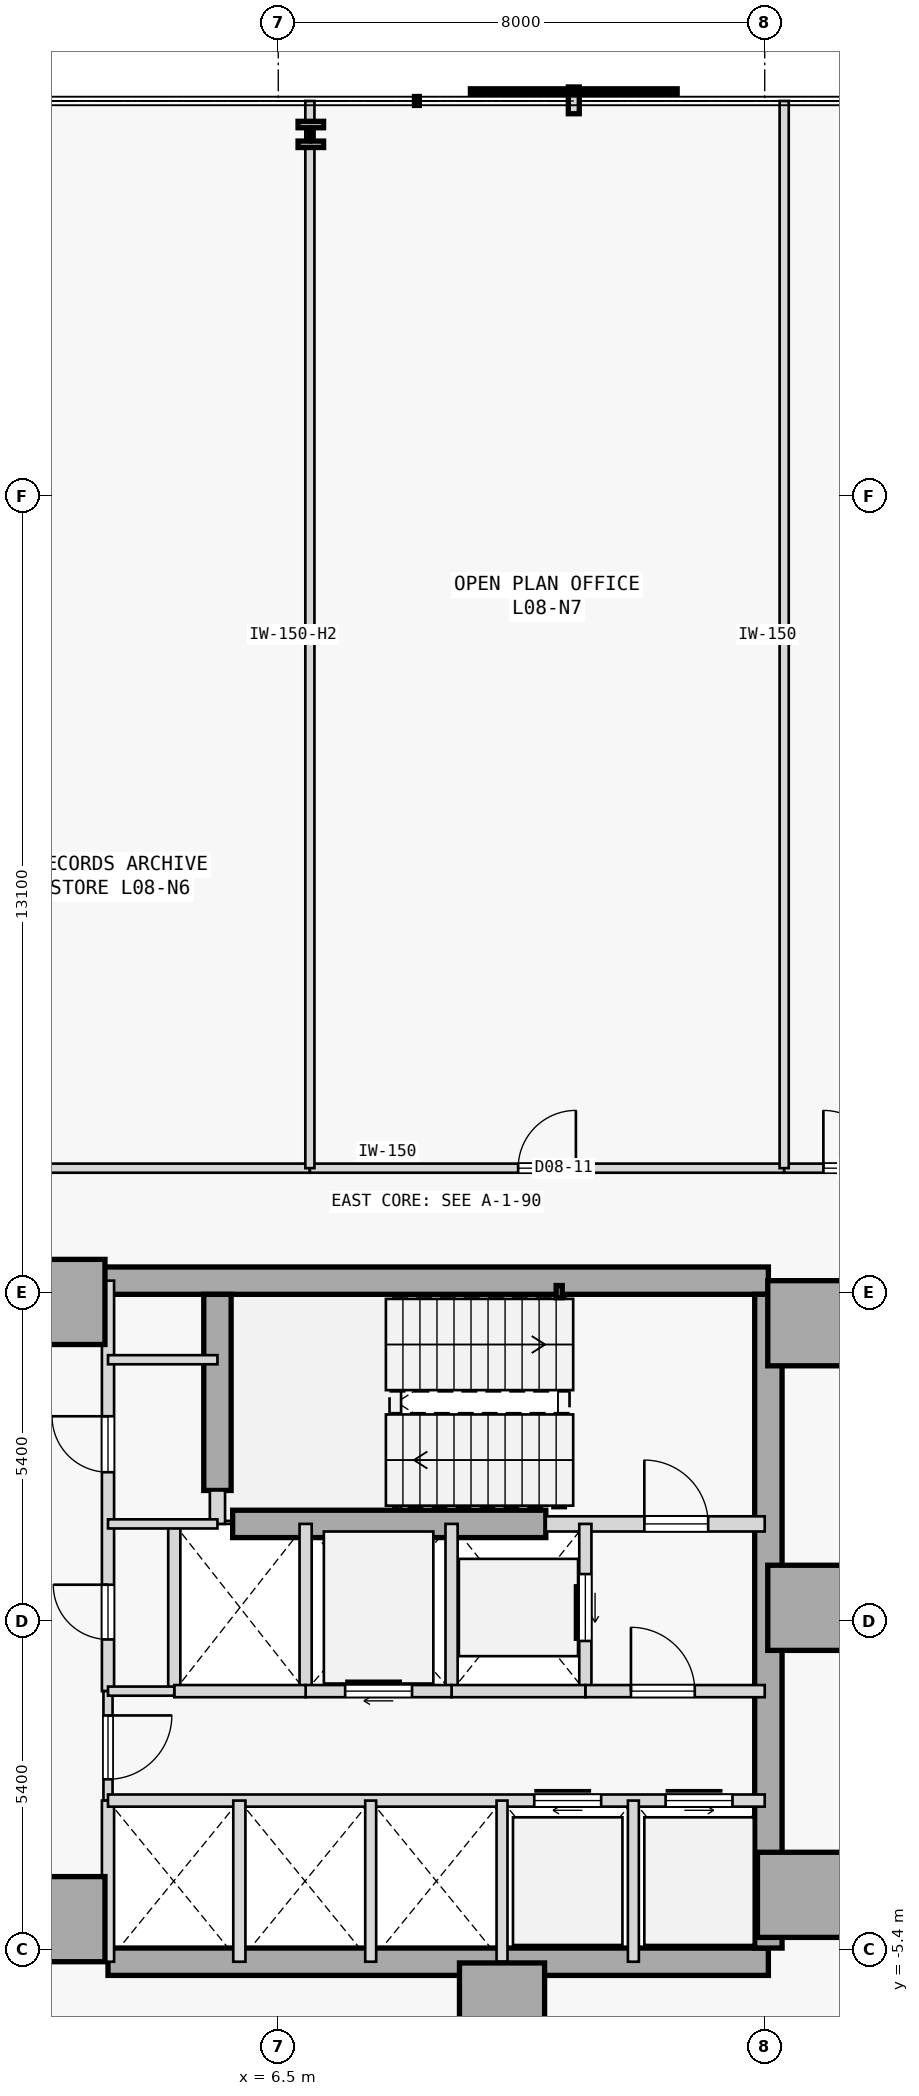
"""IFC4 building model, lengths in metres.
Left out: names, types, materials, properties, quantities, classifications, styles, units other than length and angle.
Written with IfcOpenShell. Run it as: python <this file> out.ifc"""

import sys

from ifc_helpers import new_model, si_unit, direction, frame, frame_2d, origin, origin_2d, place, context, subcontext, project, spatial, rectangle, hollow_rectangle, i_section, extrude, element, fill, save


model = new_model("IFC4")
c1 = context("Model", 3, precision=1e-05, world=origin(), true_north=direction((0.0, 1.0)))
c2 = subcontext(c1, "Body", "Model", "MODEL_VIEW")
j1 = project(units=[si_unit("LENGTHUNIT", "METRE"), si_unit("PLANEANGLEUNIT", "RADIAN")], contexts=[c1])
p1 = place(None, origin())
s1 = spatial("IfcSite", under=j1, at=p1, CompositionType="ELEMENT")
p2 = place(p1, origin())
s2 = spatial("IfcBuilding", under=s1, at=p2, CompositionType="ELEMENT")
p3 = place(p2, frame((0.0, 0.0, 37.0)))
s3 = spatial("IfcBuildingStorey", under=s2, at=p3, CompositionType="ELEMENT", Elevation=37.0)
for number, where, z_axis, x_axis in (
    (1, (15.25, 4.9, 0.0), (0.0, 0.0, 1.0), (1.0, 0.0, 0.0)),
    (2, (15.25, 0.22, 0.0), (0.0, 0.0, 1.0), (1.0, 0.0, 0.0)),
    (3, (15.08, -4.5, 0.0), (0.0, 0.0, 1.0), (1.0, 0.0, 0.0)),
    (4, (10.18, -6.32, 0.0), (0.0, 0.0, 1.0), (1.0, 0.0, 0.0)),
    (5, (2.95, -4.9, 0.0), (0.0, 0.0, 1.0), (1.0, 0.0, 0.0)),
    (6, (2.95, 5.25, 0.0), (0.0, 0.0, 1.0), (1.0, 0.0, 0.0)),
):
    element("IfcColumn", number, at=place(p3, frame(where, z_axis=z_axis, x_axis=x_axis)), inside=s3, PredefinedType="COLUMN", context=c2, shape_type="SweptSolid", body=[
        extrude(rectangle(XDim=1.4, YDim=1.4, at=origin_2d()), origin(), (0.0, 0.0, 1.0), 3.8),
    ])
p4 = place(p3, frame((3.15, 5.6, 0.0), z_axis=(0.0, 0.0, 1.0), x_axis=(1.0, 0.0, 0.0)))
e7 = element("IfcWall", 7, at=p4, inside=s3, PredefinedType="SHEAR", context=c2, shape_type="SweptSolid", body=[
    extrude(rectangle(XDim=11.41, YDim=0.45, at=frame_2d((5.705, 0.0))), origin(), (0.0, 0.0, 1.0), 3.575),
])
p5 = place(p3, frame((3.7, -5.6, 0.0), z_axis=(0.0, 0.0, 1.0), x_axis=(1.0, 0.0, 0.0)))
e8 = element("IfcWall", 8, at=p5, inside=s3, PredefinedType="SHEAR", context=c2, shape_type="SweptSolid", body=[
    extrude(rectangle(XDim=10.86, YDim=0.45, at=frame_2d((5.43, 0.0))), origin(), (0.0, 0.0, 1.0), 3.575),
])
p6 = place(p3, frame((14.56, -5.375, 0.0), z_axis=(0.0, 0.0, 1.0), x_axis=(0.0, 1.0, 0.0)))
e9 = element("IfcWall", 9, at=p6, inside=s3, PredefinedType="SHEAR", context=c2, shape_type="SweptSolid", body=[
    extrude(rectangle(XDim=10.75, YDim=0.45, at=frame_2d((5.375, 0.0))), origin(), (0.0, 0.0, 1.0), 3.575),
])
p7 = place(p3, frame((5.5, 2.15, 0.0), z_axis=(0.0, 0.0, 1.0), x_axis=(0.0, 1.0, 0.0)))
e10 = element("IfcWall", 10, at=p7, inside=s3, PredefinedType="SHEAR", context=c2, shape_type="SweptSolid", body=[
    extrude(rectangle(XDim=3.225, YDim=0.45, at=frame_2d((1.613, 0.0))), origin(), (0.0, 0.0, 1.0), 3.575),
])
p8 = place(p3, frame((5.75, 1.6, 0.0), z_axis=(0.0, 0.0, 1.0), x_axis=(1.0, 0.0, 0.0)))
e11 = element("IfcWall", 11, at=p8, inside=s3, PredefinedType="SHEAR", context=c2, shape_type="SweptSolid", body=[
    extrude(rectangle(XDim=5.15, YDim=0.45, at=frame_2d((2.575, 0.0))), origin(), (0.0, 0.0, 1.0), 3.575),
])
p9 = place(p3, frame((11.12, 5.42, 0.0), z_axis=(0.0, 0.0, 1.0), x_axis=(1.0, 0.0, 0.0)))
e12 = element("IfcColumn", 12, at=p9, inside=s3, PredefinedType="COLUMN", context=c2, shape_type="SweptSolid", body=[
    extrude(hollow_rectangle(XDim=0.1, YDim=0.2, WallThickness=0.008, at=origin_2d()), origin(), (0.0, 0.0, 1.0), 3.8),
])
p10 = place(p3, frame((7.036, 24.45, 0.0), z_axis=(0.0, 0.0, 1.0), x_axis=(1.0, 0.0, 0.0)))
e13 = element("IfcColumn", 13, at=p10, inside=s3, PredefinedType="COLUMN", context=c2, shape_type="SweptSolid", body=[
    extrude(i_section(OverallWidth=0.42, OverallDepth=0.431, WebThickness=0.065, FlangeThickness=0.106, FilletRadius=0.015, at=origin_2d()), origin(), (0.0, 0.0, 1.0), 3.8),
])
p11 = place(p3, frame((10.9, 1.6, 0.0), z_axis=(0.0, 0.0, 1.0), x_axis=(1.0, 0.0, 0.0)))
e14 = element("IfcWall", 14, at=p11, inside=s3, PredefinedType="STANDARD", context=c2, shape_type="SweptSolid", body=[
    extrude(rectangle(XDim=3.6, YDim=0.25, at=frame_2d((1.8, 0.0))), origin(), (0.0, 0.0, 1.0), 3.575),
])
p12 = place(p11, frame((1.62, 0.0, 0.0)))
e15 = element("IfcOpeningElement", 15, at=p12, cuts=e14, PredefinedType="OPENING", context=c2, shape_type="SweptSolid", body=[
    extrude(rectangle(XDim=1.05, YDim=2.15, at=frame_2d((0.525, 1.075))), frame((0.0, 0.135, 0.0), z_axis=(0.0, -1.0, 0.0), x_axis=(1.0, 0.0, 0.0)), (0.0, 0.0, 1.0), 0.27),
])
p13 = place(p3, frame((5.5, 1.6, 0.0), z_axis=(0.0, 0.0, 1.0), x_axis=(0.0, 1.0, 0.0)))
e16 = element("IfcWall", 16, at=p13, inside=s3, PredefinedType="STANDARD", context=c2, shape_type="SweptSolid", body=[
    extrude(rectangle(XDim=0.55, YDim=0.25, at=frame_2d((0.275, 0.0))), origin(), (0.0, 0.0, 1.0), 3.575),
])
p14 = place(p3, frame((3.7, -1.15, 0.0), z_axis=(0.0, 0.0, 1.0), x_axis=(0.0, 1.0, 0.0)))
e17 = element("IfcWall", 17, at=p14, inside=s3, PredefinedType="STANDARD", context=c2, shape_type="SweptSolid", body=[
    extrude(rectangle(XDim=6.75, YDim=0.2, at=frame_2d((3.375, 0.0))), origin(), (0.0, 0.0, 1.0), 3.575),
])
p15 = place(p14, frame((3.6, 0.0, 0.0)))
e18 = element("IfcOpeningElement", 18, at=p15, cuts=e17, PredefinedType="OPENING", context=c2, shape_type="SweptSolid", body=[
    extrude(rectangle(XDim=0.92, YDim=2.15, at=frame_2d((0.46, 1.075))), frame((0.0, 0.11, 0.0), z_axis=(0.0, -1.0, 0.0), x_axis=(1.0, 0.0, 0.0)), (0.0, 0.0, 1.0), 0.22),
])
p16 = place(p14, frame((0.85, 0.0, 0.0)))
e19 = element("IfcOpeningElement", 19, at=p16, cuts=e17, PredefinedType="OPENING", context=c2, shape_type="SweptSolid", body=[
    extrude(rectangle(XDim=0.9, YDim=2.15, at=frame_2d((0.45, 1.075))), frame((0.0, 0.11, 0.0), z_axis=(0.0, -1.0, 0.0), x_axis=(1.0, 0.0, 0.0)), (0.0, 0.0, 1.0), 0.22),
])
p17 = place(p3, frame((3.7, -2.95, 0.0), z_axis=(0.0, 0.0, 1.0), x_axis=(0.0, 1.0, 0.0)))
e20 = element("IfcWall", 20, at=p17, inside=s3, PredefinedType="PARTITIONING", context=c2, shape_type="SweptSolid", body=[
    extrude(rectangle(XDim=1.8, YDim=0.15, at=frame_2d((0.9, 0.0))), origin(), (0.0, 0.0, 1.0), 3.575),
])
p18 = place(p17, frame((0.35, 0.0, 0.0)))
e21 = element("IfcOpeningElement", 21, at=p18, cuts=e20, PredefinedType="OPENING", context=c2, shape_type="SweptSolid", body=[
    extrude(rectangle(XDim=1.05, YDim=2.18, at=frame_2d((0.525, 1.09))), frame((0.0, 0.085, 0.0), z_axis=(0.0, -1.0, 0.0), x_axis=(1.0, 0.0, 0.0)), (0.0, 0.0, 1.0), 0.17),
])
p19 = place(p3, frame((3.7, -5.6, 0.0), z_axis=(0.0, 0.0, 1.0), x_axis=(0.0, 1.0, 0.0)))
e22 = element("IfcWall", 22, at=p19, inside=s3, PredefinedType="STANDARD", context=c2, shape_type="SweptSolid", body=[
    extrude(rectangle(XDim=2.65, YDim=0.2, at=frame_2d((1.325, 0.0))), origin(), (0.0, 0.0, 1.0), 3.575),
])
p20 = place(p3, frame((11.55, -1.15, 0.0), z_axis=(0.0, 0.0, 1.0), x_axis=(0.0, 1.0, 0.0)))
e23 = element("IfcWall", 23, at=p20, inside=s3, PredefinedType="STANDARD", context=c2, shape_type="SweptSolid", body=[
    extrude(rectangle(XDim=2.75, YDim=0.2, at=frame_2d((1.375, 0.0))), origin(), (0.0, 0.0, 1.0), 3.575),
])
p21 = place(p20, frame((0.825, 0.0, 0.0)))
e24 = element("IfcOpeningElement", 24, at=p21, cuts=e23, PredefinedType="OPENING", context=c2, shape_type="SweptSolid", body=[
    extrude(rectangle(XDim=1.1, YDim=2.15, at=frame_2d((0.55, 1.075))), frame((0.0, 0.11, 0.0), z_axis=(0.0, -1.0, 0.0), x_axis=(1.0, 0.0, 0.0)), (0.0, 0.0, 1.0), 0.22),
])
p22 = place(p3, frame((9.35, -1.15, 0.0), z_axis=(0.0, 0.0, 1.0), x_axis=(0.0, 1.0, 0.0)))
e25 = element("IfcWall", 25, at=p22, inside=s3, PredefinedType="STANDARD", context=c2, shape_type="SweptSolid", body=[
    extrude(rectangle(XDim=2.75, YDim=0.2, at=frame_2d((1.375, 0.0))), origin(), (0.0, 0.0, 1.0), 3.575),
])
p23 = place(p3, frame((11.55, -1.15, 0.0), z_axis=(0.0, 0.0, 1.0), x_axis=(1.0, 0.0, 0.0)))
e26 = element("IfcWall", 26, at=p23, inside=s3, PredefinedType="STANDARD", context=c2, shape_type="SweptSolid", body=[
    extrude(rectangle(XDim=2.95, YDim=0.2, at=frame_2d((1.475, 0.0))), origin(), (0.0, 0.0, 1.0), 3.575),
])
p24 = place(p23, frame((0.75, 0.0, 0.0)))
e27 = element("IfcOpeningElement", 27, at=p24, cuts=e26, PredefinedType="OPENING", context=c2, shape_type="SweptSolid", body=[
    extrude(rectangle(XDim=1.05, YDim=2.18, at=frame_2d((0.525, 1.09))), frame((0.0, 0.11, 0.0), z_axis=(0.0, -1.0, 0.0), x_axis=(1.0, 0.0, 0.0)), (0.0, 0.0, 1.0), 0.22),
])
p25 = place(p3, frame((9.35, -1.15, 0.0), z_axis=(0.0, 0.0, 1.0), x_axis=(1.0, 0.0, 0.0)))
e28 = element("IfcWall", 28, at=p25, inside=s3, PredefinedType="STANDARD", context=c2, shape_type="SweptSolid", body=[
    extrude(rectangle(XDim=2.2, YDim=0.2, at=frame_2d((1.1, 0.0))), origin(), (0.0, 0.0, 1.0), 3.575),
])
p26 = place(p3, frame((6.95, -1.15, 0.0), z_axis=(0.0, 0.0, 1.0), x_axis=(0.0, 1.0, 0.0)))
e29 = element("IfcWall", 29, at=p26, inside=s3, PredefinedType="STANDARD", context=c2, shape_type="SweptSolid", body=[
    extrude(rectangle(XDim=2.75, YDim=0.2, at=frame_2d((1.375, 0.0))), origin(), (0.0, 0.0, 1.0), 3.575),
])
p27 = place(p3, frame((6.95, -1.15, 0.0), z_axis=(0.0, 0.0, 1.0), x_axis=(1.0, 0.0, 0.0)))
e30 = element("IfcWall", 30, at=p27, inside=s3, PredefinedType="STANDARD", context=c2, shape_type="SweptSolid", body=[
    extrude(rectangle(XDim=2.4, YDim=0.2, at=frame_2d((1.2, 0.0))), origin(), (0.0, 0.0, 1.0), 3.575),
])
p28 = place(p27, frame((0.65, 0.0, 0.0)))
e31 = element("IfcOpeningElement", 31, at=p28, cuts=e30, PredefinedType="OPENING", context=c2, shape_type="SweptSolid", body=[
    extrude(rectangle(XDim=1.1, YDim=2.15, at=frame_2d((0.55, 1.075))), frame((0.0, 0.11, 0.0), z_axis=(0.0, -1.0, 0.0), x_axis=(1.0, 0.0, 0.0)), (0.0, 0.0, 1.0), 0.22),
])
p29 = place(p3, frame((4.79, -1.15, 0.0), z_axis=(0.0, 0.0, 1.0), x_axis=(0.0, 1.0, 0.0)))
e32 = element("IfcWall", 32, at=p29, inside=s3, PredefinedType="STANDARD", context=c2, shape_type="SweptSolid", body=[
    extrude(rectangle(XDim=2.75, YDim=0.2, at=frame_2d((1.375, 0.0))), origin(), (0.0, 0.0, 1.0), 3.575),
])
p30 = place(p3, frame((4.79, -1.15, 0.0), z_axis=(0.0, 0.0, 1.0), x_axis=(1.0, 0.0, 0.0)))
e33 = element("IfcWall", 33, at=p30, inside=s3, PredefinedType="STANDARD", context=c2, shape_type="SweptSolid", body=[
    extrude(rectangle(XDim=2.16, YDim=0.2, at=frame_2d((1.08, 0.0))), origin(), (0.0, 0.0, 1.0), 3.575),
])
p31 = place(p3, frame((3.7, -1.15, 0.0), z_axis=(0.0, 0.0, 1.0), x_axis=(1.0, 0.0, 0.0)))
e34 = element("IfcWall", 34, at=p31, inside=s3, PredefinedType="PARTITIONING", context=c2, shape_type="SweptSolid", body=[
    extrude(rectangle(XDim=1.09, YDim=0.15, at=frame_2d((0.545, 0.0))), origin(), (0.0, 0.0, 1.0), 3.575),
])
p32 = place(p3, frame((3.7, -2.95, 0.0), z_axis=(0.0, 0.0, 1.0), x_axis=(1.0, 0.0, 0.0)))
e35 = element("IfcWall", 35, at=p32, inside=s3, PredefinedType="STANDARD", context=c2, shape_type="SweptSolid", body=[
    extrude(rectangle(XDim=10.8, YDim=0.2, at=frame_2d((5.4, 0.0))), origin(), (0.0, 0.0, 1.0), 3.575),
])
p33 = place(p32, frame((7.01, 0.0, 0.0)))
e36 = element("IfcOpeningElement", 36, at=p33, cuts=e35, PredefinedType="OPENING", context=c2, shape_type="SweptSolid", body=[
    extrude(rectangle(XDim=1.1, YDim=2.15, at=frame_2d((0.55, 1.075))), frame((0.0, 0.11, 0.0), z_axis=(0.0, -1.0, 0.0), x_axis=(1.0, 0.0, 0.0)), (0.0, 0.0, 1.0), 0.22),
])
p34 = place(p32, frame((9.17, 0.0, 0.0)))
e37 = element("IfcOpeningElement", 37, at=p34, cuts=e35, PredefinedType="OPENING", context=c2, shape_type="SweptSolid", body=[
    extrude(rectangle(XDim=1.1, YDim=2.15, at=frame_2d((0.55, 1.075))), frame((0.0, 0.11, 0.0), z_axis=(0.0, -1.0, 0.0), x_axis=(1.0, 0.0, 0.0)), (0.0, 0.0, 1.0), 0.22),
])
p35 = place(p3, frame((5.86, -5.6, 0.0), z_axis=(0.0, 0.0, 1.0), x_axis=(0.0, 1.0, 0.0)))
e38 = element("IfcWall", 38, at=p35, inside=s3, PredefinedType="STANDARD", context=c2, shape_type="SweptSolid", body=[
    extrude(rectangle(XDim=2.65, YDim=0.2, at=frame_2d((1.325, 0.0))), origin(), (0.0, 0.0, 1.0), 3.575),
])
for number, where, z_axis, x_axis in (
    (39, (12.34, -5.6, 0.0), (0.0, 0.0, 1.0), (0.0, 1.0, 0.0)),
    (40, (10.18, -5.6, 0.0), (0.0, 0.0, 1.0), (0.0, 1.0, 0.0)),
    (41, (8.02, -5.6, 0.0), (0.0, 0.0, 1.0), (0.0, 1.0, 0.0)),
):
    element("IfcWall", number, at=place(p3, frame(where, z_axis=z_axis, x_axis=x_axis)), inside=s3, PredefinedType="STANDARD", context=c2, shape_type="SweptSolid", body=[
        extrude(rectangle(XDim=2.65, YDim=0.18, at=frame_2d((1.325, 0.0))), origin(), (0.0, 0.0, 1.0), 3.575),
    ])
for number, where, z_axis, x_axis in (
    (42, (3.7, 4.3, 0.0), (0.0, 0.0, 1.0), (1.0, 0.0, 0.0)),
    (43, (3.7, 1.6, 0.0), (0.0, 0.0, 1.0), (1.0, 0.0, 0.0)),
):
    element("IfcWall", number, at=place(p3, frame(where, z_axis=z_axis, x_axis=x_axis)), inside=s3, PredefinedType="PARTITIONING", context=c2, shape_type="SweptSolid", body=[
        extrude(rectangle(XDim=1.8, YDim=0.15, at=frame_2d((0.9, 0.0))), origin(), (0.0, 0.0, 1.0), 3.575),
    ])
p36 = place(p3, frame((0.92, 7.45, 0.0), z_axis=(0.0, 0.0, 1.0), x_axis=(1.0, 0.0, 0.0)))
e44 = element("IfcWall", 44, at=p36, inside=s3, PredefinedType="PARTITIONING", context=c2, shape_type="SweptSolid", body=[
    extrude(rectangle(XDim=6.1, YDim=0.15, at=frame_2d((3.05, 0.0))), origin(), (0.0, 0.0, 1.0), 3.575),
])
p37 = place(p3, frame((7.02, 7.45, 0.0), z_axis=(0.0, 0.0, 1.0), x_axis=(1.0, 0.0, 0.0)))
e45 = element("IfcWall", 45, at=p37, inside=s3, PredefinedType="PARTITIONING", context=c2, shape_type="SweptSolid", body=[
    extrude(rectangle(XDim=7.8, YDim=0.15, at=frame_2d((3.9, 0.0))), origin(), (0.0, 0.0, 1.0), 3.575),
])
p38 = place(p37, frame((3.425, 0.0, 0.0)))
e46 = element("IfcOpeningElement", 46, at=p38, cuts=e45, PredefinedType="OPENING", context=c2, shape_type="SweptSolid", body=[
    extrude(rectangle(XDim=0.95, YDim=2.15, at=frame_2d((0.475, 1.075))), frame((0.0, 0.085, 0.0), z_axis=(0.0, -1.0, 0.0), x_axis=(1.0, 0.0, 0.0)), (0.0, 0.0, 1.0), 0.17),
])
p39 = place(p3, frame((14.82, 7.45, 0.0), z_axis=(0.0, 0.0, 1.0), x_axis=(1.0, 0.0, 0.0)))
e47 = element("IfcWall", 47, at=p39, inside=s3, PredefinedType="PARTITIONING", context=c2, shape_type="SweptSolid", body=[
    extrude(rectangle(XDim=2.239, YDim=0.15, at=frame_2d((1.12, 0.0))), origin(), (0.0, 0.0, 1.0), 3.575),
])
p40 = place(p39, frame((0.645, 0.0, 0.0)))
e48 = element("IfcOpeningElement", 48, at=p40, cuts=e47, PredefinedType="OPENING", context=c2, shape_type="SweptSolid", body=[
    extrude(rectangle(XDim=0.95, YDim=2.15, at=frame_2d((0.475, 1.075))), frame((0.0, 0.085, 0.0), z_axis=(0.0, -1.0, 0.0), x_axis=(1.0, 0.0, 0.0)), (0.0, 0.0, 1.0), 0.17),
])
p41 = place(p3, frame((7.02, 7.45, 0.0), z_axis=(0.0, 0.0, 1.0), x_axis=(0.0, 1.0, 0.0)))
e49 = element("IfcWall", 49, at=p41, inside=s3, PredefinedType="PARTITIONING", context=c2, shape_type="SweptSolid", body=[
    extrude(rectangle(XDim=17.55, YDim=0.15, at=frame_2d((8.775, 0.0))), origin(), (0.0, 0.0, 1.0), 2.975),
])
p42 = place(p3, frame((14.82, 7.45, 0.0), z_axis=(0.0, 0.0, 1.0), x_axis=(0.0, 1.0, 0.0)))
e50 = element("IfcWall", 50, at=p42, inside=s3, PredefinedType="PARTITIONING", context=c2, shape_type="SweptSolid", body=[
    extrude(rectangle(XDim=17.55, YDim=0.15, at=frame_2d((8.775, 0.0))), origin(), (0.0, 0.0, 1.0), 3.575),
])
p43 = place(p12, origin())
e51 = element("IfcDoor", 51, at=p43, inside=s3, OperationType="SINGLE_SWING_LEFT", PredefinedType="DOOR", context=c2, shape_type="SweptSolid", body=[
    extrude(rectangle(XDim=1.05, YDim=2.15, at=frame_2d((0.525, 1.075))), frame((0.0, 0.025, 0.0), z_axis=(0.0, -1.0, 0.0), x_axis=(1.0, 0.0, 0.0)), (0.0, 0.0, 1.0), 0.05),
])
fill(e15, e51)
p44 = place(p24, origin())
e52 = element("IfcDoor", 52, at=p44, inside=s3, OperationType="SINGLE_SWING_LEFT", PredefinedType="DOOR", context=c2, shape_type="SweptSolid", body=[
    extrude(rectangle(XDim=1.05, YDim=2.18, at=frame_2d((0.525, 1.09))), frame((0.0, 0.025, 0.0), z_axis=(0.0, -1.0, 0.0), x_axis=(1.0, 0.0, 0.0)), (0.0, 0.0, 1.0), 0.05),
])
fill(e27, e52)
p45 = place(p18, frame((1.05, 0.0, 0.0), z_axis=(0.0, 0.0, 1.0), x_axis=(-1.0, 0.0, 0.0)))
e53 = element("IfcDoor", 53, at=p45, inside=s3, OperationType="SINGLE_SWING_RIGHT", PredefinedType="DOOR", context=c2, shape_type="SweptSolid", body=[
    extrude(rectangle(XDim=1.05, YDim=2.18, at=frame_2d((0.525, 1.09))), frame((0.0, 0.025, 0.0), z_axis=(0.0, -1.0, 0.0), x_axis=(1.0, 0.0, 0.0)), (0.0, 0.0, 1.0), 0.05),
])
fill(e21, e53)
p46 = place(p21, origin())
e54 = element("IfcDoor", 54, at=p46, inside=s3, OperationType="SLIDING_TO_RIGHT", PredefinedType="DOOR", context=c2, shape_type="SweptSolid", body=[
    extrude(rectangle(XDim=1.1, YDim=2.15, at=frame_2d((0.55, 1.075))), frame((0.0, 0.025, 0.0), z_axis=(0.0, -1.0, 0.0), x_axis=(1.0, 0.0, 0.0)), (0.0, 0.0, 1.0), 0.05),
])
fill(e24, e54)
p47 = place(p28, origin())
e55 = element("IfcDoor", 55, at=p47, inside=s3, OperationType="SLIDING_TO_RIGHT", PredefinedType="DOOR", context=c2, shape_type="SweptSolid", body=[
    extrude(rectangle(XDim=1.1, YDim=2.15, at=frame_2d((0.55, 1.075))), frame((0.0, 0.025, 0.0), z_axis=(0.0, -1.0, 0.0), x_axis=(1.0, 0.0, 0.0)), (0.0, 0.0, 1.0), 0.05),
])
fill(e31, e55)
p48 = place(p33, origin())
e56 = element("IfcDoor", 56, at=p48, inside=s3, OperationType="SLIDING_TO_RIGHT", PredefinedType="DOOR", context=c2, shape_type="SweptSolid", body=[
    extrude(rectangle(XDim=1.1, YDim=2.15, at=frame_2d((0.55, 1.075))), frame((0.0, 0.025, 0.0), z_axis=(0.0, -1.0, 0.0), x_axis=(1.0, 0.0, 0.0)), (0.0, 0.0, 1.0), 0.05),
])
fill(e36, e56)
p49 = place(p34, origin())
e57 = element("IfcDoor", 57, at=p49, inside=s3, OperationType="SLIDING_TO_LEFT", PredefinedType="DOOR", context=c2, shape_type="SweptSolid", body=[
    extrude(rectangle(XDim=1.1, YDim=2.15, at=frame_2d((0.55, 1.075))), frame((0.0, 0.025, 0.0), z_axis=(0.0, -1.0, 0.0), x_axis=(1.0, 0.0, 0.0)), (0.0, 0.0, 1.0), 0.05),
])
fill(e37, e57)
p50 = place(p15, origin())
e58 = element("IfcDoor", 58, at=p50, inside=s3, OperationType="SINGLE_SWING_RIGHT", PredefinedType="DOOR", context=c2, shape_type="SweptSolid", body=[
    extrude(rectangle(XDim=0.92, YDim=2.15, at=frame_2d((0.46, 1.075))), frame((0.0, 0.025, 0.0), z_axis=(0.0, -1.0, 0.0), x_axis=(1.0, 0.0, 0.0)), (0.0, 0.0, 1.0), 0.05),
])
fill(e18, e58)
p51 = place(p16, origin())
e59 = element("IfcDoor", 59, at=p51, inside=s3, OperationType="SINGLE_SWING_RIGHT", PredefinedType="DOOR", context=c2, shape_type="SweptSolid", body=[
    extrude(rectangle(XDim=0.9, YDim=2.15, at=frame_2d((0.45, 1.075))), frame((0.0, 0.025, 0.0), z_axis=(0.0, -1.0, 0.0), x_axis=(1.0, 0.0, 0.0)), (0.0, 0.0, 1.0), 0.05),
])
fill(e19, e59)
p52 = place(p38, origin())
e60 = element("IfcDoor", 60, at=p52, inside=s3, OperationType="SINGLE_SWING_RIGHT", PredefinedType="DOOR", context=c2, shape_type="SweptSolid", body=[
    extrude(rectangle(XDim=0.95, YDim=2.15, at=frame_2d((0.475, 1.075))), frame((0.0, 0.025, 0.0), z_axis=(0.0, -1.0, 0.0), x_axis=(1.0, 0.0, 0.0)), (0.0, 0.0, 1.0), 0.05),
])
fill(e46, e60)
p53 = place(p40, origin())
e61 = element("IfcDoor", 61, at=p53, inside=s3, OperationType="SINGLE_SWING_LEFT", PredefinedType="DOOR", context=c2, shape_type="SweptSolid", body=[
    extrude(rectangle(XDim=0.95, YDim=2.15, at=frame_2d((0.475, 1.075))), frame((0.0, 0.025, 0.0), z_axis=(0.0, -1.0, 0.0), x_axis=(1.0, 0.0, 0.0)), (0.0, 0.0, 1.0), 0.05),
])
fill(e48, e61)
save(model, sys.argv[1])
